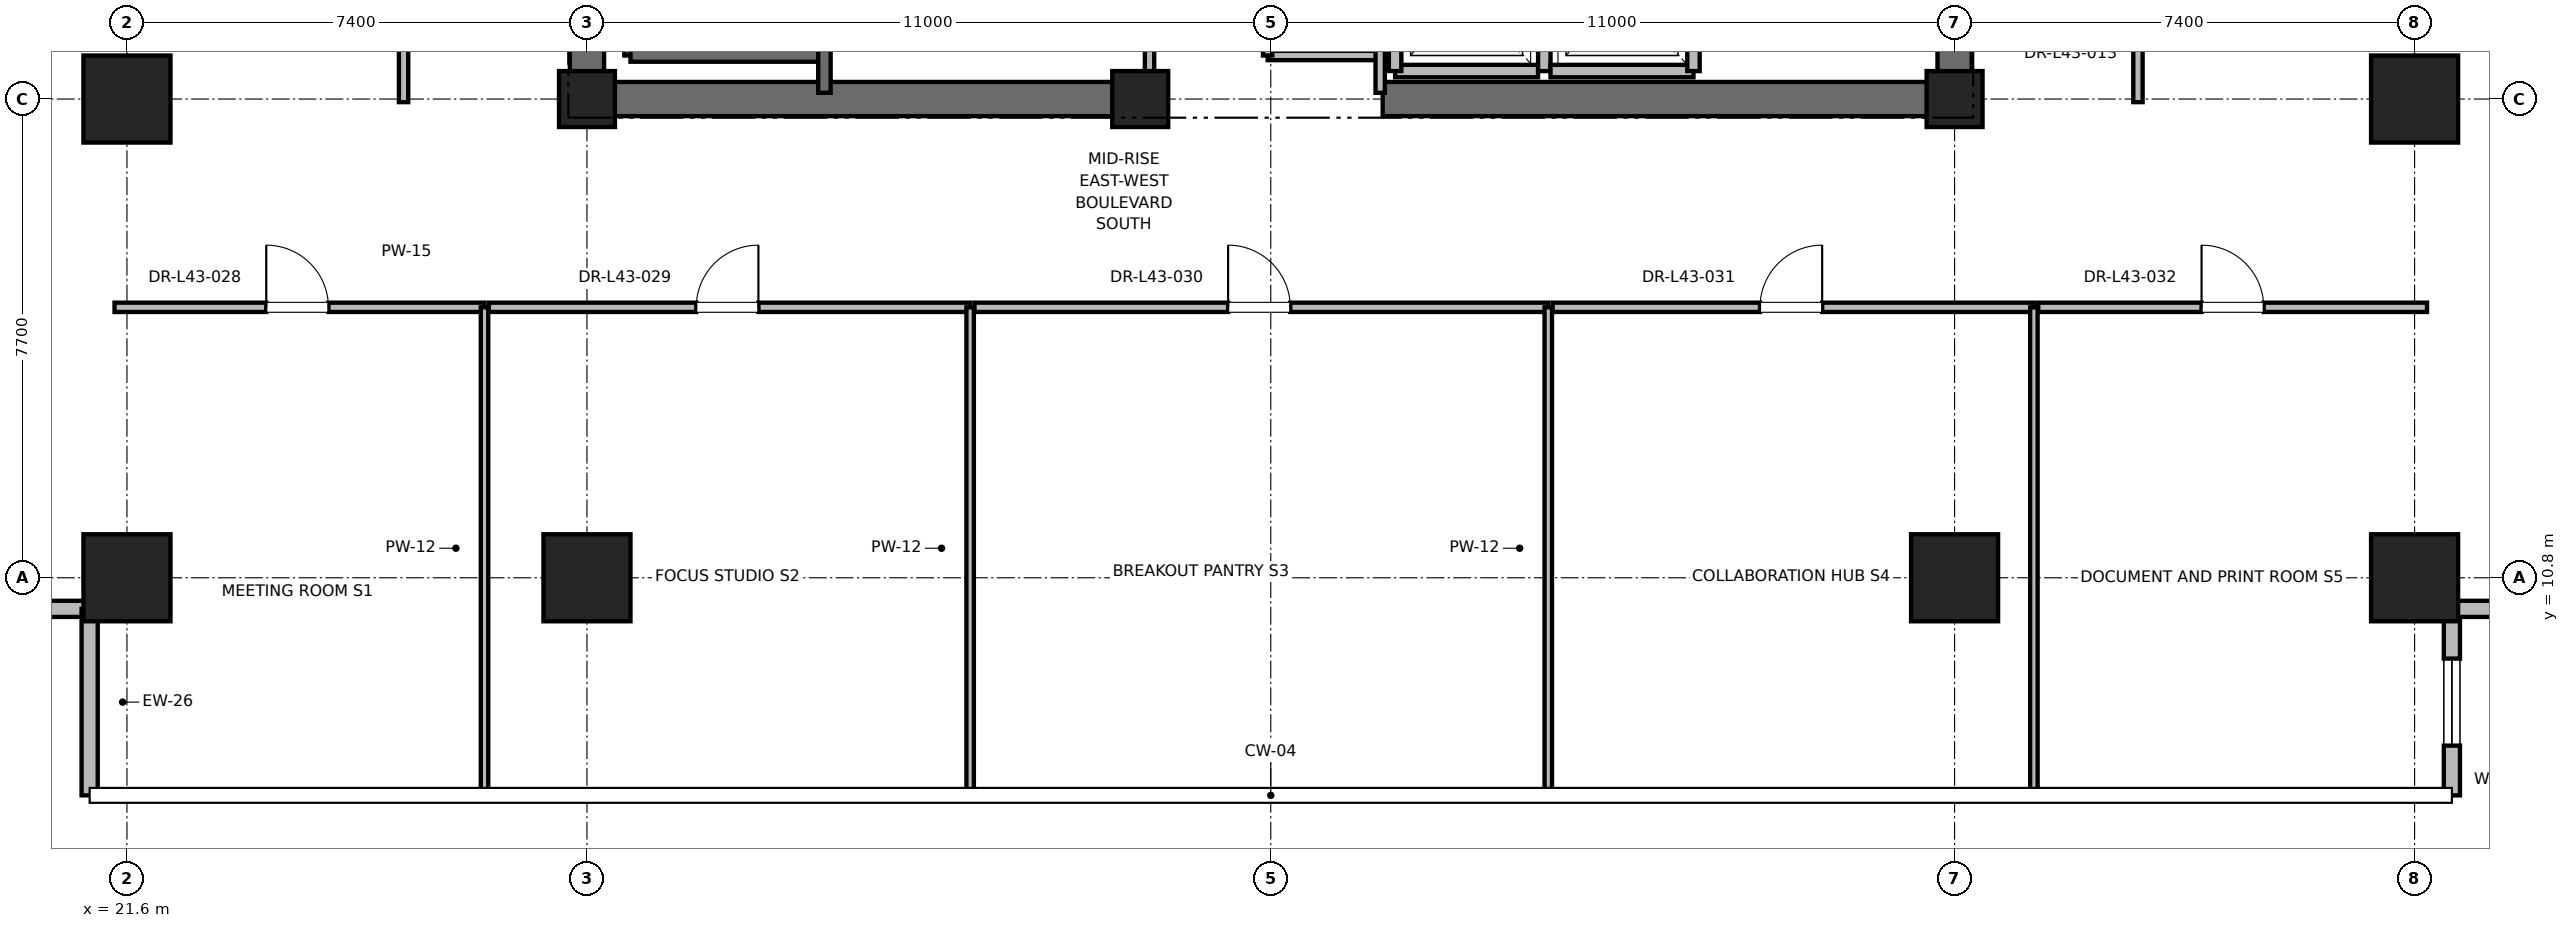
"""IFC4 building model, lengths in metres.
Left out: names, types, materials, properties, quantities, classifications, styles, units other than length and angle.
Written with IfcOpenShell. Run it as: python <this file> out.ifc"""

import sys

from ifc_helpers import new_model, si_unit, direction, frame, frame_2d, origin, origin_2d, place, context, subcontext, project, spatial, rectangle, extrude, element, fill, save


model = new_model("IFC4")
c1 = context("Model", 3, precision=1e-05, world=origin(), true_north=direction((0.0, 1.0)))
c2 = subcontext(c1, "Body", "Model", "MODEL_VIEW")
j1 = project(units=[si_unit("LENGTHUNIT", "METRE"), si_unit("PLANEANGLEUNIT", "RADIAN")], contexts=[c1])
p1 = place(None, origin())
s1 = spatial("IfcSite", under=j1, at=p1, CompositionType="ELEMENT")
p2 = place(p1, origin())
s2 = spatial("IfcBuilding", under=s1, at=p2, CompositionType="ELEMENT")
p3 = place(p2, frame((0.0, 0.0, 184.4)))
s3 = spatial("IfcBuildingStorey", under=s2, at=p3, CompositionType="ELEMENT", Elevation=184.4)
for number, where, z_axis, x_axis in (
    (1, (29.0, 10.8, 0.0), (0.0, 0.0, 1.0), (1.0, 0.0, 0.0)),
    (2, (51.0, 10.8, 0.0), (0.0, 0.0, 1.0), (1.0, 0.0, 0.0)),
    (3, (21.6, 18.5, 0.0), (0.0, 0.0, 1.0), (1.0, 0.0, 0.0)),
    (4, (58.4, 18.5, 0.0), (0.0, 0.0, 1.0), (1.0, 0.0, 0.0)),
    (5, (21.6, 10.8, 0.0), (0.0, 0.0, 1.0), (1.0, 0.0, 0.0)),
    (6, (58.4, 10.8, 0.0), (0.0, 0.0, 1.0), (1.0, 0.0, 0.0)),
):
    element("IfcColumn", number, at=place(p3, frame(where, z_axis=z_axis, x_axis=x_axis)), inside=s3, PredefinedType="COLUMN", context=c2, shape_type="SweptSolid", body=[
        extrude(rectangle(XDim=1.4, YDim=1.4, at=origin_2d()), origin(), (0.0, 0.0, 1.0), 5.0),
    ])
for number, where, z_axis, x_axis in (
    (7, (29.0, 18.5, 0.0), (0.0, 0.0, 1.0), (1.0, 0.0, 0.0)),
    (8, (51.0, 18.5, 0.0), (0.0, 0.0, 1.0), (1.0, 0.0, 0.0)),
    (9, (37.9, 18.5, 0.0), (0.0, 0.0, 1.0), (1.0, 0.0, 0.0)),
):
    element("IfcColumn", number, at=place(p3, frame(where, z_axis=z_axis, x_axis=x_axis)), inside=s3, PredefinedType="PILASTER", context=c2, shape_type="SweptSolid", body=[
        extrude(rectangle(XDim=0.9, YDim=0.9, at=origin_2d()), origin(), (0.0, 0.0, 1.0), 5.0),
    ])
for number, where, z_axis, x_axis in (
    (10, (29.0, 18.5, 0.0), (0.0, 0.0, 1.0), (1.0, 0.0, 0.0)),
    (11, (41.8, 18.5, 0.0), (0.0, 0.0, 1.0), (1.0, 0.0, 0.0)),
):
    element("IfcWall", number, at=place(p3, frame(where, z_axis=z_axis, x_axis=x_axis)), inside=s3, PredefinedType="SHEAR", context=c2, shape_type="SweptSolid", body=[
        extrude(rectangle(XDim=9.2, YDim=0.55, at=frame_2d((4.6, 0.0))), origin(), (0.0, 0.0, 1.0), 4.7),
    ])
p4 = place(p3, frame((29.0, 18.5, 0.0), z_axis=(0.0, 0.0, 1.0), x_axis=(0.0, 1.0, 0.0)))
e12 = element("IfcWall", 12, at=p4, inside=s3, PredefinedType="SHEAR", context=c2, shape_type="SweptSolid", body=[
    extrude(rectangle(XDim=8.8, YDim=0.55, at=frame_2d((4.4, 0.0))), origin(), (0.0, 0.0, 1.0), 4.7),
])
p5 = place(p3, frame((51.0, 18.5, 0.0), z_axis=(0.0, 0.0, 1.0), x_axis=(0.0, 1.0, 0.0)))
e13 = element("IfcWall", 13, at=p5, inside=s3, PredefinedType="SHEAR", context=c2, shape_type="SweptSolid", body=[
    extrude(rectangle(XDim=5.8, YDim=0.55, at=frame_2d((2.9, 0.0))), origin(), (0.0, 0.0, 1.0), 4.7),
])
p6 = place(p3, frame((17.6, 10.3, 0.0), z_axis=(0.0, 0.0, 1.0), x_axis=(1.0, 0.0, 0.0)))
e14 = element("IfcWall", 14, at=p6, inside=s3, PredefinedType="PARAPET", context=c2, shape_type="SweptSolid", body=[
    extrude(rectangle(XDim=3.4, YDim=0.26, at=frame_2d((1.7, 0.0))), origin(), (0.0, 0.0, 1.0), 4.7),
])
p7 = place(p6, frame((1.0, 0.0, 0.85)))
e15 = element("IfcOpeningElement", 15, at=p7, cuts=e14, PredefinedType="OPENING", context=c2, shape_type="SweptSolid", body=[
    extrude(rectangle(XDim=1.4, YDim=2.0, at=frame_2d((0.7, 1.0))), frame((0.0, 0.13, 0.0), z_axis=(0.0, -1.0, 0.0), x_axis=(1.0, 0.0, 0.0)), (0.0, 0.0, 1.0), 0.26),
])
p8 = place(p3, frame((21.0, 10.3, 0.0), z_axis=(0.0, 0.0, 1.0), x_axis=(0.0, -1.0, 0.0)))
e16 = element("IfcWall", 16, at=p8, inside=s3, PredefinedType="PARAPET", context=c2, shape_type="SweptSolid", body=[
    extrude(rectangle(XDim=3.0, YDim=0.26, at=frame_2d((1.5, 0.0))), origin(), (0.0, 0.0, 1.0), 4.7),
])
p9 = place(p3, frame((59.0, 7.3, 0.0), z_axis=(0.0, 0.0, 1.0), x_axis=(0.0, 1.0, 0.0)))
e17 = element("IfcWall", 17, at=p9, inside=s3, PredefinedType="PARAPET", context=c2, shape_type="SweptSolid", body=[
    extrude(rectangle(XDim=3.0, YDim=0.26, at=frame_2d((1.5, 0.0))), origin(), (0.0, 0.0, 1.0), 4.7),
])
p10 = place(p9, frame((0.8, 0.0, 0.85)))
e18 = element("IfcOpeningElement", 18, at=p10, cuts=e17, PredefinedType="OPENING", context=c2, shape_type="SweptSolid", body=[
    extrude(rectangle(XDim=1.4, YDim=2.0, at=frame_2d((0.7, 1.0))), frame((0.0, 0.13, 0.0), z_axis=(0.0, -1.0, 0.0), x_axis=(1.0, 0.0, 0.0)), (0.0, 0.0, 1.0), 0.26),
])
p11 = place(p3, frame((59.0, 10.3, 0.0), z_axis=(0.0, 0.0, 1.0), x_axis=(1.0, 0.0, 0.0)))
e19 = element("IfcWall", 19, at=p11, inside=s3, PredefinedType="PARAPET", context=c2, shape_type="SweptSolid", body=[
    extrude(rectangle(XDim=3.4, YDim=0.26, at=frame_2d((1.7, 0.0))), origin(), (0.0, 0.0, 1.0), 4.7),
])
p12 = place(p3, frame((29.7, 19.2, 0.0), z_axis=(0.0, 0.0, 1.0), x_axis=(0.0, 1.0, 0.0)))
e20 = element("IfcWall", 20, at=p12, inside=s3, PredefinedType="SOLIDWALL", context=c2, shape_type="SweptSolid", body=[
    extrude(rectangle(XDim=8.15, YDim=0.2, at=frame_2d((4.075, 0.0))), origin(), (0.0, 0.0, 1.0), 4.7),
])
p13 = place(p3, frame((29.7, 19.2, 0.0), z_axis=(0.0, 0.0, 1.0), x_axis=(1.0, 0.0, 0.0)))
e21 = element("IfcWall", 21, at=p13, inside=s3, PredefinedType="SOLIDWALL", context=c2, shape_type="SweptSolid", body=[
    extrude(rectangle(XDim=3.12, YDim=0.2, at=frame_2d((1.56, 0.0))), origin(), (0.0, 0.0, 1.0), 4.7),
])
p14 = place(p3, frame((32.82, 18.6, 0.0), z_axis=(0.0, 0.0, 1.0), x_axis=(0.0, 1.0, 0.0)))
e22 = element("IfcWall", 22, at=p14, inside=s3, PredefinedType="SOLIDWALL", context=c2, shape_type="SweptSolid", body=[
    extrude(rectangle(XDim=8.78, YDim=0.2, at=frame_2d((4.39, 0.0))), origin(), (0.0, 0.0, 1.0), 4.7),
])
p15 = place(p3, frame((42.0, 18.95, 0.0), z_axis=(0.0, 0.0, 1.0), x_axis=(1.0, 0.0, 0.0)))
e23 = element("IfcWall", 23, at=p15, inside=s3, PredefinedType="SOLIDWALL", context=c2, shape_type="SweptSolid", body=[
    extrude(rectangle(XDim=2.3, YDim=0.2, at=frame_2d((1.15, 0.0))), origin(), (0.0, 0.0, 1.0), 3.68),
])
p16 = place(p3, frame((42.0, 21.55, 0.0), z_axis=(0.0, 0.0, 1.0), x_axis=(0.0, -1.0, 0.0)))
e24 = element("IfcWall", 24, at=p16, inside=s3, PredefinedType="SOLIDWALL", context=c2, shape_type="SweptSolid", body=[
    extrude(rectangle(XDim=2.6, YDim=0.2, at=frame_2d((1.3, 0.0))), origin(), (0.0, 0.0, 1.0), 3.68),
])
p17 = place(p3, frame((44.4, 18.95, 0.0), z_axis=(0.0, 0.0, 1.0), x_axis=(0.0, 1.0, 0.0)))
e25 = element("IfcWall", 25, at=p17, inside=s3, PredefinedType="SOLIDWALL", context=c2, shape_type="SweptSolid", body=[
    extrude(rectangle(XDim=2.6, YDim=0.2, at=frame_2d((1.3, 0.0))), origin(), (0.0, 0.0, 1.0), 4.7),
])
p18 = place(p3, frame((44.5, 18.95, 0.0), z_axis=(0.0, 0.0, 1.0), x_axis=(1.0, 0.0, 0.0)))
e26 = element("IfcWall", 26, at=p18, inside=s3, PredefinedType="SOLIDWALL", context=c2, shape_type="SweptSolid", body=[
    extrude(rectangle(XDim=2.3, YDim=0.2, at=frame_2d((1.15, 0.0))), origin(), (0.0, 0.0, 1.0), 4.7),
])
p19 = place(p3, frame((46.8, 18.95, 0.0), z_axis=(0.0, 0.0, 1.0), x_axis=(0.0, 1.0, 0.0)))
e27 = element("IfcWall", 27, at=p19, inside=s3, PredefinedType="SOLIDWALL", context=c2, shape_type="SweptSolid", body=[
    extrude(rectangle(XDim=2.6, YDim=0.2, at=frame_2d((1.3, 0.0))), origin(), (0.0, 0.0, 1.0), 4.7),
])
p20 = place(p3, frame((39.95, 19.2, 0.0), z_axis=(0.0, 0.0, 1.0), x_axis=(1.0, 0.0, 0.0)))
e28 = element("IfcWall", 28, at=p20, inside=s3, PredefinedType="PARTITIONING", context=c2, shape_type="SweptSolid", body=[
    extrude(rectangle(XDim=1.81, YDim=0.15, at=frame_2d((0.905, 0.0))), origin(), (0.0, 0.0, 1.0), 2.85),
])
p21 = place(p3, frame((41.76, 18.6, 0.0), z_axis=(0.0, 0.0, 1.0), x_axis=(0.0, 1.0, 0.0)))
e29 = element("IfcWall", 29, at=p21, inside=s3, PredefinedType="PARTITIONING", context=c2, shape_type="SweptSolid", body=[
    extrude(rectangle(XDim=3.6, YDim=0.15, at=frame_2d((1.8, 0.0))), origin(), (0.0, 0.0, 1.0), 2.85),
])
p22 = place(p3, frame((39.95, 19.2, 0.0), z_axis=(0.0, 0.0, 1.0), x_axis=(0.0, 1.0, 0.0)))
e30 = element("IfcWall", 30, at=p22, inside=s3, PredefinedType="PARTITIONING", context=c2, shape_type="SweptSolid", body=[
    extrude(rectangle(XDim=3.0, YDim=0.15, at=frame_2d((1.5, 0.0))), origin(), (0.0, 0.0, 1.0), 2.85),
])
p23 = place(p22, frame((1.05, 0.0, 0.0)))
e31 = element("IfcOpeningElement", 31, at=p23, cuts=e30, PredefinedType="OPENING", context=c2, shape_type="SweptSolid", body=[
    extrude(rectangle(XDim=0.9, YDim=2.1, at=frame_2d((0.45, 1.05))), frame((0.0, 0.075, 0.0), z_axis=(0.0, -1.0, 0.0), x_axis=(1.0, 0.0, 0.0)), (0.0, 0.0, 1.0), 0.15),
])
p24 = place(p3, frame((38.05, 18.6, 0.0), z_axis=(0.0, 0.0, 1.0), x_axis=(0.0, 1.0, 0.0)))
e32 = element("IfcWall", 32, at=p24, inside=s3, PredefinedType="PARTITIONING", context=c2, shape_type="SweptSolid", body=[
    extrude(rectangle(XDim=3.06, YDim=0.15, at=frame_2d((1.53, 0.0))), origin(), (0.0, 0.0, 1.0), 2.85),
])
p25 = place(p24, frame((1.03, 0.0, 0.0)))
e33 = element("IfcOpeningElement", 33, at=p25, cuts=e32, PredefinedType="OPENING", context=c2, shape_type="SweptSolid", body=[
    extrude(rectangle(XDim=1.0, YDim=2.15, at=frame_2d((0.5, 1.075))), frame((0.0, 0.075, 0.0), z_axis=(0.0, -1.0, 0.0), x_axis=(1.0, 0.0, 0.0)), (0.0, 0.0, 1.0), 0.15),
])
p26 = place(p3, frame((21.4, 15.15, 0.0), z_axis=(0.0, 0.0, 1.0), x_axis=(1.0, 0.0, 0.0)))
e34 = element("IfcWall", 34, at=p26, inside=s3, PredefinedType="PARTITIONING", context=c2, shape_type="SweptSolid", body=[
    extrude(rectangle(XDim=5.952, YDim=0.15, at=frame_2d((2.976, 0.0))), origin(), (0.0, 0.0, 1.0), 2.85),
])
p27 = place(p26, frame((2.441, 0.0, 0.0)))
e35 = element("IfcOpeningElement", 35, at=p27, cuts=e34, PredefinedType="OPENING", context=c2, shape_type="SweptSolid", body=[
    extrude(rectangle(XDim=1.0, YDim=2.15, at=frame_2d((0.5, 1.075))), frame((0.0, 0.075, 0.0), z_axis=(0.0, -1.0, 0.0), x_axis=(1.0, 0.0, 0.0)), (0.0, 0.0, 1.0), 0.15),
])
p28 = place(p3, frame((27.352, 7.4, 0.0), z_axis=(0.0, 0.0, 1.0), x_axis=(0.0, 1.0, 0.0)))
e36 = element("IfcWall", 36, at=p28, inside=s3, PredefinedType="PARTITIONING", context=c2, shape_type="SweptSolid", body=[
    extrude(rectangle(XDim=7.75, YDim=0.12, at=frame_2d((3.875, 0.0))), origin(), (0.0, 0.0, 1.0), 2.85),
])
p29 = place(p3, frame((27.422, 15.15, 0.0), z_axis=(0.0, 0.0, 1.0), x_axis=(1.0, 0.0, 0.0)))
e37 = element("IfcWall", 37, at=p29, inside=s3, PredefinedType="PARTITIONING", context=c2, shape_type="SweptSolid", body=[
    extrude(rectangle(XDim=7.742, YDim=0.15, at=frame_2d((3.871, 0.0))), origin(), (0.0, 0.0, 1.0), 2.85),
])
p30 = place(p29, frame((3.336, 0.0, 0.0)))
e38 = element("IfcOpeningElement", 38, at=p30, cuts=e37, PredefinedType="OPENING", context=c2, shape_type="SweptSolid", body=[
    extrude(rectangle(XDim=1.0, YDim=2.15, at=frame_2d((0.5, 1.075))), frame((0.0, 0.075, 0.0), z_axis=(0.0, -1.0, 0.0), x_axis=(1.0, 0.0, 0.0)), (0.0, 0.0, 1.0), 0.15),
])
p31 = place(p3, frame((35.164, 7.4, 0.0), z_axis=(0.0, 0.0, 1.0), x_axis=(0.0, 1.0, 0.0)))
e39 = element("IfcWall", 39, at=p31, inside=s3, PredefinedType="PARTITIONING", context=c2, shape_type="SweptSolid", body=[
    extrude(rectangle(XDim=7.75, YDim=0.12, at=frame_2d((3.875, 0.0))), origin(), (0.0, 0.0, 1.0), 2.85),
])
p32 = place(p3, frame((35.234, 15.15, 0.0), z_axis=(0.0, 0.0, 1.0), x_axis=(1.0, 0.0, 0.0)))
e40 = element("IfcWall", 40, at=p32, inside=s3, PredefinedType="PARTITIONING", context=c2, shape_type="SweptSolid", body=[
    extrude(rectangle(XDim=9.23, YDim=0.15, at=frame_2d((4.615, 0.0))), origin(), (0.0, 0.0, 1.0), 2.85),
])
p33 = place(p32, frame((4.08, 0.0, 0.0)))
e41 = element("IfcOpeningElement", 41, at=p33, cuts=e40, PredefinedType="OPENING", context=c2, shape_type="SweptSolid", body=[
    extrude(rectangle(XDim=1.0, YDim=2.15, at=frame_2d((0.5, 1.075))), frame((0.0, 0.075, 0.0), z_axis=(0.0, -1.0, 0.0), x_axis=(1.0, 0.0, 0.0)), (0.0, 0.0, 1.0), 0.15),
])
p34 = place(p3, frame((44.464, 7.4, 0.0), z_axis=(0.0, 0.0, 1.0), x_axis=(0.0, 1.0, 0.0)))
e42 = element("IfcWall", 42, at=p34, inside=s3, PredefinedType="PARTITIONING", context=c2, shape_type="SweptSolid", body=[
    extrude(rectangle(XDim=7.75, YDim=0.12, at=frame_2d((3.875, 0.0))), origin(), (0.0, 0.0, 1.0), 2.85),
])
p35 = place(p3, frame((44.534, 15.15, 0.0), z_axis=(0.0, 0.0, 1.0), x_axis=(1.0, 0.0, 0.0)))
e43 = element("IfcWall", 43, at=p35, inside=s3, PredefinedType="PARTITIONING", context=c2, shape_type="SweptSolid", body=[
    extrude(rectangle(XDim=7.742, YDim=0.15, at=frame_2d((3.871, 0.0))), origin(), (0.0, 0.0, 1.0), 2.85),
])
p36 = place(p35, frame((3.336, 0.0, 0.0)))
e44 = element("IfcOpeningElement", 44, at=p36, cuts=e43, PredefinedType="OPENING", context=c2, shape_type="SweptSolid", body=[
    extrude(rectangle(XDim=1.0, YDim=2.15, at=frame_2d((0.5, 1.075))), frame((0.0, 0.075, 0.0), z_axis=(0.0, -1.0, 0.0), x_axis=(1.0, 0.0, 0.0)), (0.0, 0.0, 1.0), 0.15),
])
p37 = place(p3, frame((52.276, 7.4, 0.0), z_axis=(0.0, 0.0, 1.0), x_axis=(0.0, 1.0, 0.0)))
e45 = element("IfcWall", 45, at=p37, inside=s3, PredefinedType="PARTITIONING", context=c2, shape_type="SweptSolid", body=[
    extrude(rectangle(XDim=7.75, YDim=0.12, at=frame_2d((3.875, 0.0))), origin(), (0.0, 0.0, 1.0), 2.85),
])
p38 = place(p3, frame((52.346, 15.15, 0.0), z_axis=(0.0, 0.0, 1.0), x_axis=(1.0, 0.0, 0.0)))
e46 = element("IfcWall", 46, at=p38, inside=s3, PredefinedType="PARTITIONING", context=c2, shape_type="SweptSolid", body=[
    extrude(rectangle(XDim=6.254, YDim=0.15, at=frame_2d((3.127, 0.0))), origin(), (0.0, 0.0, 1.0), 2.85),
])
p39 = place(p38, frame((2.627, 0.0, 0.0)))
e47 = element("IfcOpeningElement", 47, at=p39, cuts=e46, PredefinedType="OPENING", context=c2, shape_type="SweptSolid", body=[
    extrude(rectangle(XDim=1.0, YDim=2.15, at=frame_2d((0.5, 1.075))), frame((0.0, 0.075, 0.0), z_axis=(0.0, -1.0, 0.0), x_axis=(1.0, 0.0, 0.0)), (0.0, 0.0, 1.0), 0.15),
])
p40 = place(p3, frame((26.05, 18.45, 0.0), z_axis=(0.0, 0.0, 1.0), x_axis=(0.0, 1.0, 0.0)))
e48 = element("IfcWall", 48, at=p40, inside=s3, PredefinedType="PARTITIONING", context=c2, shape_type="SweptSolid", body=[
    extrude(rectangle(XDim=5.249, YDim=0.15, at=frame_2d((2.625, 0.0))), origin(), (0.0, 0.0, 1.0), 2.85),
])
p41 = place(p40, frame((2.165, 0.0, 0.0)))
e49 = element("IfcOpeningElement", 49, at=p41, cuts=e48, PredefinedType="OPENING", context=c2, shape_type="SweptSolid", body=[
    extrude(rectangle(XDim=1.0, YDim=2.15, at=frame_2d((0.5, 1.075))), frame((0.0, 0.075, 0.0), z_axis=(0.0, -1.0, 0.0), x_axis=(1.0, 0.0, 0.0)), (0.0, 0.0, 1.0), 0.15),
])
p42 = place(p3, frame((53.95, 18.45, 0.0), z_axis=(0.0, 0.0, 1.0), x_axis=(0.0, 1.0, 0.0)))
e50 = element("IfcWall", 50, at=p42, inside=s3, PredefinedType="PARTITIONING", context=c2, shape_type="SweptSolid", body=[
    extrude(rectangle(XDim=3.982, YDim=0.15, at=frame_2d((1.991, 0.0))), origin(), (0.0, 0.0, 1.0), 2.85),
])
p43 = place(p42, frame((1.531, 0.0, 0.0)))
e51 = element("IfcOpeningElement", 51, at=p43, cuts=e50, PredefinedType="OPENING", context=c2, shape_type="SweptSolid", body=[
    extrude(rectangle(XDim=1.0, YDim=2.15, at=frame_2d((0.5, 1.075))), frame((0.0, 0.075, 0.0), z_axis=(0.0, -1.0, 0.0), x_axis=(1.0, 0.0, 0.0)), (0.0, 0.0, 1.0), 0.15),
])
p44 = place(p10, origin())
e52 = element("IfcWindow", 52, at=p44, inside=s3, PartitioningType="SINGLE_PANEL", PredefinedType="WINDOW", context=c2, shape_type="SweptSolid", body=[
    extrude(rectangle(XDim=1.4, YDim=2.0, at=frame_2d((0.7, 1.0))), frame((0.0, 0.03, 0.0), z_axis=(0.0, -1.0, 0.0), x_axis=(1.0, 0.0, 0.0)), (0.0, 0.0, 1.0), 0.06),
])
fill(e18, e52)
p45 = place(p27, origin())
e53 = element("IfcDoor", 53, at=p45, inside=s3, OperationType="SINGLE_SWING_LEFT", PredefinedType="DOOR", context=c2, shape_type="SweptSolid", body=[
    extrude(rectangle(XDim=1.0, YDim=2.15, at=frame_2d((0.5, 1.075))), frame((0.0, 0.025, 0.0), z_axis=(0.0, -1.0, 0.0), x_axis=(1.0, 0.0, 0.0)), (0.0, 0.0, 1.0), 0.05),
])
fill(e35, e53)
p46 = place(p30, origin())
e54 = element("IfcDoor", 54, at=p46, inside=s3, OperationType="SINGLE_SWING_RIGHT", PredefinedType="DOOR", context=c2, shape_type="SweptSolid", body=[
    extrude(rectangle(XDim=1.0, YDim=2.15, at=frame_2d((0.5, 1.075))), frame((0.0, 0.025, 0.0), z_axis=(0.0, -1.0, 0.0), x_axis=(1.0, 0.0, 0.0)), (0.0, 0.0, 1.0), 0.05),
])
fill(e38, e54)
p47 = place(p33, origin())
e55 = element("IfcDoor", 55, at=p47, inside=s3, OperationType="SINGLE_SWING_LEFT", PredefinedType="DOOR", context=c2, shape_type="SweptSolid", body=[
    extrude(rectangle(XDim=1.0, YDim=2.15, at=frame_2d((0.5, 1.075))), frame((0.0, 0.025, 0.0), z_axis=(0.0, -1.0, 0.0), x_axis=(1.0, 0.0, 0.0)), (0.0, 0.0, 1.0), 0.05),
])
fill(e41, e55)
p48 = place(p36, origin())
e56 = element("IfcDoor", 56, at=p48, inside=s3, OperationType="SINGLE_SWING_RIGHT", PredefinedType="DOOR", context=c2, shape_type="SweptSolid", body=[
    extrude(rectangle(XDim=1.0, YDim=2.15, at=frame_2d((0.5, 1.075))), frame((0.0, 0.025, 0.0), z_axis=(0.0, -1.0, 0.0), x_axis=(1.0, 0.0, 0.0)), (0.0, 0.0, 1.0), 0.05),
])
fill(e44, e56)
p49 = place(p39, origin())
e57 = element("IfcDoor", 57, at=p49, inside=s3, OperationType="SINGLE_SWING_LEFT", PredefinedType="DOOR", context=c2, shape_type="SweptSolid", body=[
    extrude(rectangle(XDim=1.0, YDim=2.15, at=frame_2d((0.5, 1.075))), frame((0.0, 0.025, 0.0), z_axis=(0.0, -1.0, 0.0), x_axis=(1.0, 0.0, 0.0)), (0.0, 0.0, 1.0), 0.05),
])
fill(e47, e57)
save(model, sys.argv[1])
